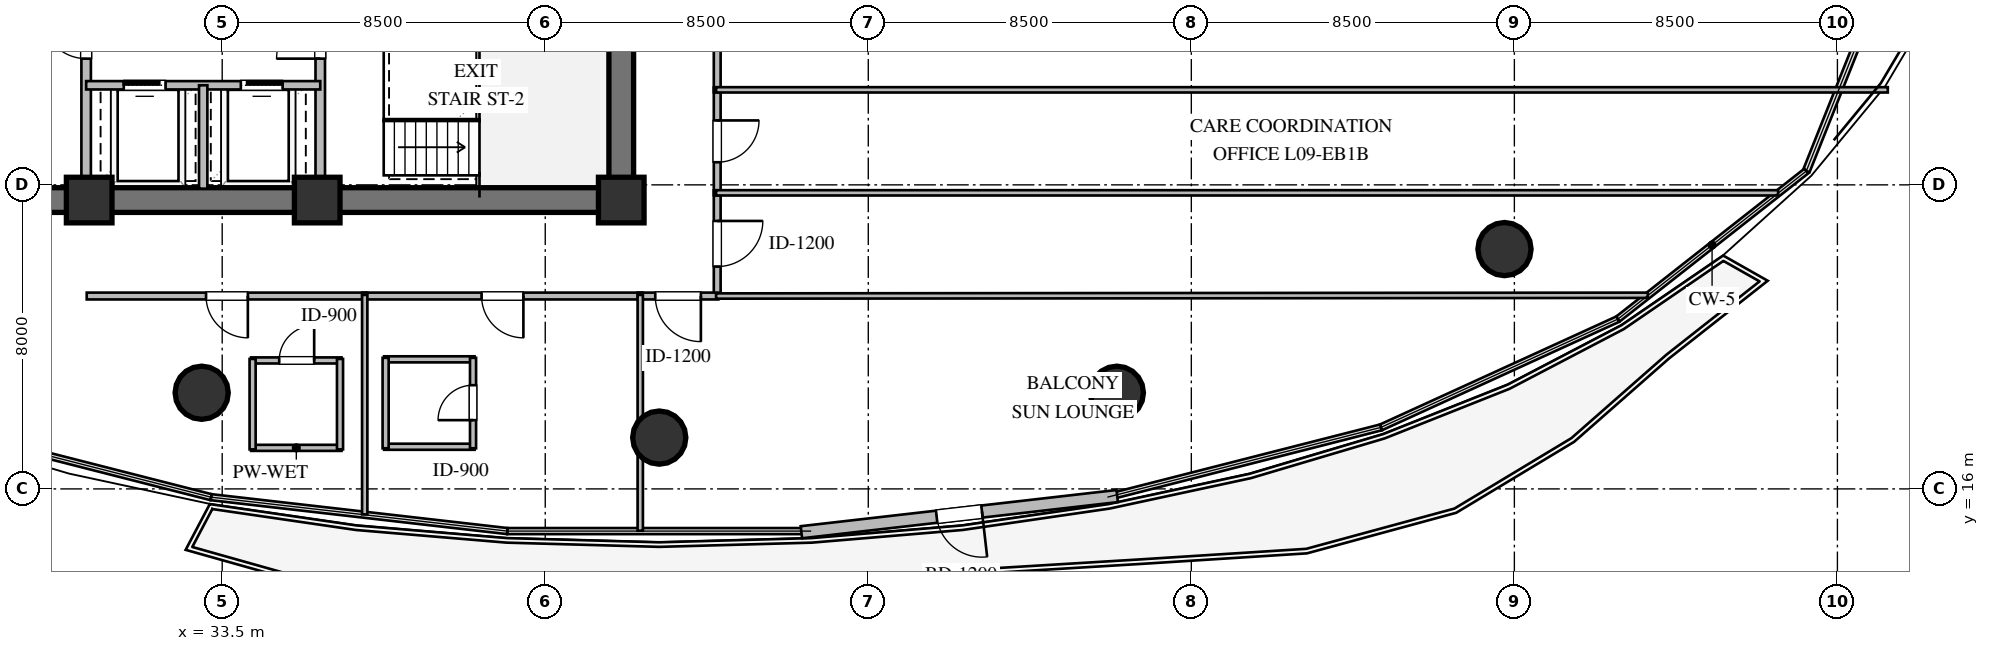
"""IFC4 building model, lengths in metres.
Left out: names, types, materials, properties, quantities, classifications, styles, units other than length and angle.
Written with IfcOpenShell. Run it as: python <this file> out.ifc"""

import sys

from ifc_helpers import new_model, si_unit, direction, frame, frame_2d, origin, origin_2d, place, context, subcontext, project, spatial, rectangle, circle, extrude, element, fill, save


model = new_model("IFC4")
c1 = context("Model", 3, precision=1e-05, world=origin(), true_north=direction((0.0, 1.0)))
c2 = subcontext(c1, "Body", "Model", "MODEL_VIEW")
j1 = project(units=[si_unit("LENGTHUNIT", "METRE"), si_unit("PLANEANGLEUNIT", "RADIAN")], contexts=[c1])
p1 = place(None, origin())
s1 = spatial("IfcSite", under=j1, at=p1, CompositionType="ELEMENT")
p2 = place(p1, origin())
s2 = spatial("IfcBuilding", under=s1, at=p2, CompositionType="ELEMENT")
p3 = place(p2, frame((0.0, 0.0, 38.4)))
s3 = spatial("IfcBuildingStorey", under=s2, at=p3, CompositionType="ELEMENT", Elevation=38.4)
p4 = place(p3, frame((21.675, 23.6, 0.0), z_axis=(0.0, 0.0, 1.0), x_axis=(1.0, 0.0, 0.0)))
e1 = element("IfcWall", 1, at=p4, inside=s3, PredefinedType="SHEAR", context=c2, shape_type="SweptSolid", body=[
    extrude(rectangle(XDim=22.65, YDim=0.65, at=frame_2d((11.325, 0.0))), origin(), (0.0, 0.0, 1.0), 3.36),
])
p5 = place(p3, frame((44.0, 23.925, 0.0), z_axis=(0.0, 0.0, 1.0), x_axis=(0.0, 1.0, 0.0)))
e2 = element("IfcWall", 2, at=p5, inside=s3, PredefinedType="SHEAR", context=c2, shape_type="SweptSolid", body=[
    extrude(rectangle(XDim=12.15, YDim=0.65, at=frame_2d((6.075, 0.0))), origin(), (0.0, 0.0, 1.0), 3.36),
])
p6 = place(p5, frame((8.775, 0.0, 0.0)))
e3 = element("IfcOpeningElement", 3, at=p6, cuts=e2, PredefinedType="OPENING", context=c2, shape_type="SweptSolid", body=[
    extrude(rectangle(XDim=1.5, YDim=2.15, at=frame_2d((0.75, 1.075))), frame((0.0, 0.335, 0.0), z_axis=(0.0, -1.0, 0.0), x_axis=(1.0, 0.0, 0.0)), (0.0, 0.0, 1.0), 0.67),
])
for number, where, z_axis, x_axis in (
    (4, (30.0, 23.6, 0.0), (0.0, 0.0, 1.0), (1.0, 0.0, 0.0)),
    (5, (36.0, 23.6, 0.0), (0.0, 0.0, 1.0), (1.0, 0.0, 0.0)),
    (6, (44.0, 23.6, 0.0), (0.0, 0.0, 1.0), (1.0, 0.0, 0.0)),
):
    element("IfcColumn", number, at=place(p3, frame(where, z_axis=z_axis, x_axis=x_axis)), inside=s3, PredefinedType="COLUMN", context=c2, shape_type="SweptSolid", body=[
        extrude(rectangle(XDim=1.2, YDim=1.2, at=origin_2d()), origin(), (0.0, 0.0, 1.0), 3.6),
    ])
for number, where, z_axis, x_axis in (
    (7, (32.96, 18.53, 0.0), (0.0, 0.0, 1.0), (1.0, 0.0, 0.0)),
    (8, (45.0, 17.35, 0.0), (0.0, 0.0, 1.0), (1.0, 0.0, 0.0)),
    (9, (57.04, 18.53, 0.0), (0.0, 0.0, 1.0), (1.0, 0.0, 0.0)),
    (10, (67.24, 22.31, 0.0), (0.0, 0.0, 1.0), (1.0, 0.0, 0.0)),
):
    element("IfcColumn", number, at=place(p3, frame(where, z_axis=z_axis, x_axis=x_axis)), inside=s3, PredefinedType="COLUMN", context=c2, shape_type="SweptSolid", body=[
        extrude(circle(Radius=0.7, at=origin_2d()), origin(), (0.0, 0.0, 1.0), 3.6),
    ])
p7 = place(p3, frame((57.05, 15.812, 0.0), z_axis=(0.0, 0.0, 1.0), x_axis=(-0.993503192468, -0.113804246649, 0.0)))
e11 = element("IfcWall", 11, at=p7, inside=s3, PredefinedType="STANDARD", context=c2, shape_type="SweptSolid", body=[
    extrude(rectangle(XDim=8.365, YDim=0.32, at=frame_2d((4.182, 0.0))), origin(), (0.0, 0.0, 1.0), 3.36),
])
p8 = place(p7, frame((3.582, 0.0, 0.0)))
e12 = element("IfcOpeningElement", 12, at=p8, cuts=e11, PredefinedType="OPENING", context=c2, shape_type="SweptSolid", body=[
    extrude(rectangle(XDim=1.2, YDim=2.15, at=frame_2d((0.6, 1.075))), frame((0.0, 0.17, 0.0), z_axis=(0.0, -1.0, 0.0), x_axis=(1.0, 0.0, 0.0)), (0.0, 0.0, 1.0), 0.34),
])
p9 = place(p3, frame((29.92, 23.9, 0.0), z_axis=(0.0, 0.0, 1.0), x_axis=(0.0, 1.0, 0.0)))
e13 = element("IfcWall", 13, at=p9, inside=s3, PredefinedType="SOLIDWALL", context=c2, shape_type="SweptSolid", body=[
    extrude(rectangle(XDim=5.4, YDim=0.25, at=frame_2d((2.7, 0.0))), origin(), (0.0, 0.0, 1.0), 3.36),
])
p10 = place(p9, frame((3.421, 0.0, 0.0)))
e14 = element("IfcOpeningElement", 14, at=p10, cuts=e13, PredefinedType="OPENING", context=c2, shape_type="SweptSolid", body=[
    extrude(rectangle(XDim=1.15, YDim=2.1, at=frame_2d((0.575, 1.05))), frame((0.0, 0.135, 0.0), z_axis=(0.0, -1.0, 0.0), x_axis=(1.0, 0.0, 0.0)), (0.0, 0.0, 1.0), 0.27),
])
p11 = place(p3, frame((36.08, 23.9, 0.0), z_axis=(0.0, 0.0, 1.0), x_axis=(0.0, 1.0, 0.0)))
e15 = element("IfcWall", 15, at=p11, inside=s3, PredefinedType="SOLIDWALL", context=c2, shape_type="SweptSolid", body=[
    extrude(rectangle(XDim=5.4, YDim=0.25, at=frame_2d((2.7, 0.0))), origin(), (0.0, 0.0, 1.0), 3.36),
])
p12 = place(p11, frame((3.421, 0.0, 0.0)))
e16 = element("IfcOpeningElement", 16, at=p12, cuts=e15, PredefinedType="OPENING", context=c2, shape_type="SweptSolid", body=[
    extrude(rectangle(XDim=1.15, YDim=2.1, at=frame_2d((0.575, 1.05))), frame((0.0, 0.135, 0.0), z_axis=(0.0, -1.0, 0.0), x_axis=(1.0, 0.0, 0.0)), (0.0, 0.0, 1.0), 0.27),
])
p13 = place(p3, frame((29.92, 26.62, 0.0), z_axis=(0.0, 0.0, 1.0), x_axis=(1.0, 0.0, 0.0)))
e17 = element("IfcWall", 17, at=p13, inside=s3, PredefinedType="SOLIDWALL", context=c2, shape_type="SweptSolid", body=[
    extrude(rectangle(XDim=6.16, YDim=0.22, at=frame_2d((3.08, 0.0))), origin(), (0.0, 0.0, 1.0), 3.36),
])
p14 = place(p13, frame((0.99, 0.0, 0.0)))
e18 = element("IfcOpeningElement", 18, at=p14, cuts=e17, PredefinedType="OPENING", context=c2, shape_type="SweptSolid", body=[
    extrude(rectangle(XDim=1.1, YDim=2.1, at=frame_2d((0.55, 1.05))), frame((0.0, 0.12, 0.0), z_axis=(0.0, -1.0, 0.0), x_axis=(1.0, 0.0, 0.0)), (0.0, 0.0, 1.0), 0.24),
])
p15 = place(p13, frame((4.07, 0.0, 0.0)))
e19 = element("IfcOpeningElement", 19, at=p15, cuts=e17, PredefinedType="OPENING", context=c2, shape_type="SweptSolid", body=[
    extrude(rectangle(XDim=1.1, YDim=2.1, at=frame_2d((0.55, 1.05))), frame((0.0, 0.12, 0.0), z_axis=(0.0, -1.0, 0.0), x_axis=(1.0, 0.0, 0.0)), (0.0, 0.0, 1.0), 0.24),
])
p16 = place(p3, frame((33.0, 23.9, 0.0), z_axis=(0.0, 0.0, 1.0), x_axis=(0.0, 1.0, 0.0)))
e20 = element("IfcWall", 20, at=p16, inside=s3, PredefinedType="SOLIDWALL", context=c2, shape_type="SweptSolid", body=[
    extrude(rectangle(XDim=2.72, YDim=0.22, at=frame_2d((1.36, 0.0))), origin(), (0.0, 0.0, 1.0), 3.36),
])
p17 = place(p3, frame((34.26, 17.08, 0.0), z_axis=(0.0, 0.0, 1.0), x_axis=(1.0, 0.0, 0.0)))
e21 = element("IfcWall", 21, at=p17, inside=s3, PredefinedType="PLUMBINGWALL", context=c2, shape_type="SweptSolid", body=[
    extrude(rectangle(XDim=2.38, YDim=0.16, at=frame_2d((1.19, 0.0))), origin(), (0.0, 0.0, 1.0), 3.36),
])
p18 = place(p3, frame((34.26, 19.38, 0.0), z_axis=(0.0, 0.0, 1.0), x_axis=(1.0, 0.0, 0.0)))
e22 = element("IfcWall", 22, at=p18, inside=s3, PredefinedType="PLUMBINGWALL", context=c2, shape_type="SweptSolid", body=[
    extrude(rectangle(XDim=2.38, YDim=0.16, at=frame_2d((1.19, 0.0))), origin(), (0.0, 0.0, 1.0), 3.36),
])
p19 = place(p18, frame((0.74, 0.0, 0.0)))
e23 = element("IfcOpeningElement", 23, at=p19, cuts=e22, PredefinedType="OPENING", context=c2, shape_type="SweptSolid", body=[
    extrude(rectangle(XDim=0.92, YDim=2.1, at=frame_2d((0.46, 1.05))), frame((0.0, 0.09, 0.0), z_axis=(0.0, -1.0, 0.0), x_axis=(1.0, 0.0, 0.0)), (0.0, 0.0, 1.0), 0.18),
])
for number, where, z_axis, x_axis in (
    (24, (34.3, 17.04, 0.0), (0.0, 0.0, 1.0), (0.0, 1.0, 0.0)),
    (25, (36.6, 17.04, 0.0), (0.0, 0.0, 1.0), (0.0, 1.0, 0.0)),
    (26, (37.76, 17.109, 0.0), (0.0, 0.0, 1.0), (1.0, 0.0, 0.0)),
    (27, (37.76, 19.409, 0.0), (0.0, 0.0, 1.0), (1.0, 0.0, 0.0)),
    (28, (37.8, 17.069, 0.0), (0.0, 0.0, 1.0), (0.0, 1.0, 0.0)),
):
    element("IfcWall", number, at=place(p3, frame(where, z_axis=z_axis, x_axis=x_axis)), inside=s3, PredefinedType="PLUMBINGWALL", context=c2, shape_type="SweptSolid", body=[
        extrude(rectangle(XDim=2.38, YDim=0.16, at=frame_2d((1.19, 0.0))), origin(), (0.0, 0.0, 1.0), 3.36),
    ])
p20 = place(p3, frame((40.1, 17.069, 0.0), z_axis=(0.0, 0.0, 1.0), x_axis=(0.0, 1.0, 0.0)))
e29 = element("IfcWall", 29, at=p20, inside=s3, PredefinedType="PLUMBINGWALL", context=c2, shape_type="SweptSolid", body=[
    extrude(rectangle(XDim=2.38, YDim=0.16, at=frame_2d((1.19, 0.0))), origin(), (0.0, 0.0, 1.0), 3.36),
])
p21 = place(p20, frame((0.74, 0.0, 0.0)))
e30 = element("IfcOpeningElement", 30, at=p21, cuts=e29, PredefinedType="OPENING", context=c2, shape_type="SweptSolid", body=[
    extrude(rectangle(XDim=0.92, YDim=2.1, at=frame_2d((0.46, 1.05))), frame((0.0, 0.09, 0.0), z_axis=(0.0, -1.0, 0.0), x_axis=(1.0, 0.0, 0.0)), (0.0, 0.0, 1.0), 0.18),
])
p22 = place(p3, frame((46.525, 23.855, 0.0), z_axis=(0.0, 0.0, 1.0), x_axis=(0.0, -1.0, 0.0)))
e31 = element("IfcWall", 31, at=p22, inside=s3, PredefinedType="PARTITIONING", context=c2, shape_type="SweptSolid", body=[
    extrude(rectangle(XDim=2.81, YDim=0.18, at=frame_2d((1.405, 0.0))), origin(), (0.0, 0.0, 1.0), 3.36),
])
p23 = place(p22, frame((0.805, 0.0, 0.0)))
e32 = element("IfcOpeningElement", 32, at=p23, cuts=e31, PredefinedType="OPENING", context=c2, shape_type="SweptSolid", body=[
    extrude(rectangle(XDim=1.2, YDim=2.15, at=frame_2d((0.6, 1.075))), frame((0.0, 0.1, 0.0), z_axis=(0.0, -1.0, 0.0), x_axis=(1.0, 0.0, 0.0)), (0.0, 0.0, 1.0), 0.2),
])
p24 = place(p3, frame((46.525, 26.565, 0.0), z_axis=(0.0, 0.0, 1.0), x_axis=(0.0, -1.0, 0.0)))
e33 = element("IfcWall", 33, at=p24, inside=s3, PredefinedType="PARTITIONING", context=c2, shape_type="SweptSolid", body=[
    extrude(rectangle(XDim=2.84, YDim=0.18, at=frame_2d((1.42, 0.0))), origin(), (0.0, 0.0, 1.0), 3.36),
])
p25 = place(p24, frame((0.87, 0.0, 0.0)))
e34 = element("IfcOpeningElement", 34, at=p25, cuts=e33, PredefinedType="OPENING", context=c2, shape_type="SweptSolid", body=[
    extrude(rectangle(XDim=1.1, YDim=2.1, at=frame_2d((0.55, 1.05))), frame((0.0, 0.1, 0.0), z_axis=(0.0, -1.0, 0.0), x_axis=(1.0, 0.0, 0.0)), (0.0, 0.0, 1.0), 0.2),
])
p26 = place(p3, frame((46.525, 30.565, 0.0), z_axis=(0.0, 0.0, 1.0), x_axis=(0.0, -1.0, 0.0)))
e35 = element("IfcWall", 35, at=p26, inside=s3, PredefinedType="PARTITIONING", context=c2, shape_type="SweptSolid", body=[
    extrude(rectangle(XDim=4.13, YDim=0.18, at=frame_2d((2.065, 0.0))), origin(), (0.0, 0.0, 1.0), 3.36),
])
p27 = place(p26, frame((1.515, 0.0, 0.0)))
e36 = element("IfcOpeningElement", 36, at=p27, cuts=e35, PredefinedType="OPENING", context=c2, shape_type="SweptSolid", body=[
    extrude(rectangle(XDim=1.1, YDim=2.1, at=frame_2d((0.55, 1.05))), frame((0.0, 0.1, 0.0), z_axis=(0.0, -1.0, 0.0), x_axis=(1.0, 0.0, 0.0)), (0.0, 0.0, 1.0), 0.2),
])
p28 = place(p3, frame((37.315, 21.075, 0.0), z_axis=(0.0, 0.0, 1.0), x_axis=(-1.0, 0.0, 0.0)))
e37 = element("IfcWall", 37, at=p28, inside=s3, PredefinedType="PARTITIONING", context=c2, shape_type="SweptSolid", body=[
    extrude(rectangle(XDim=7.38, YDim=0.18, at=frame_2d((3.69, 0.0))), origin(), (0.0, 0.0, 1.0), 2.996),
])
p29 = place(p28, frame((3.14, 0.0, 0.0)))
e38 = element("IfcOpeningElement", 38, at=p29, cuts=e37, PredefinedType="OPENING", context=c2, shape_type="SweptSolid", body=[
    extrude(rectangle(XDim=1.1, YDim=2.1, at=frame_2d((0.55, 1.05))), frame((0.0, 0.1, 0.0), z_axis=(0.0, -1.0, 0.0), x_axis=(1.0, 0.0, 0.0)), (0.0, 0.0, 1.0), 0.2),
])
p30 = place(p3, frame((44.565, 21.075, 0.0), z_axis=(0.0, 0.0, 1.0), x_axis=(-1.0, 0.0, 0.0)))
e39 = element("IfcWall", 39, at=p30, inside=s3, PredefinedType="PARTITIONING", context=c2, shape_type="SweptSolid", body=[
    extrude(rectangle(XDim=7.38, YDim=0.18, at=frame_2d((3.69, 0.0))), origin(), (0.0, 0.0, 1.0), 2.996),
])
p31 = place(p30, frame((3.14, 0.0, 0.0)))
e40 = element("IfcOpeningElement", 40, at=p31, cuts=e39, PredefinedType="OPENING", context=c2, shape_type="SweptSolid", body=[
    extrude(rectangle(XDim=1.1, YDim=2.1, at=frame_2d((0.55, 1.05))), frame((0.0, 0.1, 0.0), z_axis=(0.0, -1.0, 0.0), x_axis=(1.0, 0.0, 0.0)), (0.0, 0.0, 1.0), 0.2),
])
p32 = place(p3, frame((46.555, 21.075, 0.0), z_axis=(0.0, 0.0, 1.0), x_axis=(-1.0, 0.0, 0.0)))
e41 = element("IfcWall", 41, at=p32, inside=s3, PredefinedType="PARTITIONING", context=c2, shape_type="SweptSolid", body=[
    extrude(rectangle(XDim=2.12, YDim=0.18, at=frame_2d((1.06, 0.0))), origin(), (0.0, 0.0, 1.0), 3.36),
])
p33 = place(p32, frame((0.46, 0.0, 0.0)))
e42 = element("IfcOpeningElement", 42, at=p33, cuts=e41, PredefinedType="OPENING", context=c2, shape_type="SweptSolid", body=[
    extrude(rectangle(XDim=1.2, YDim=2.15, at=frame_2d((0.6, 1.075))), frame((0.0, 0.1, 0.0), z_axis=(0.0, -1.0, 0.0), x_axis=(1.0, 0.0, 0.0)), (0.0, 0.0, 1.0), 0.2),
])
p34 = place(p3, frame((46.495, 23.79, 0.0), z_axis=(0.0, 0.0, 1.0), x_axis=(1.0, 0.0, 0.0)))
e43 = element("IfcWall", 43, at=p34, inside=s3, PredefinedType="PARTITIONING", context=c2, shape_type="SweptSolid", body=[
    extrude(rectangle(XDim=27.946, YDim=0.14, at=frame_2d((13.973, 0.0))), origin(), (0.0, 0.0, 1.0), 2.89),
])
p35 = place(p3, frame((71.011, 21.094, 0.0), z_axis=(0.0, 0.0, 1.0), x_axis=(-0.999999682646, -0.000796685534, 0.0)))
e44 = element("IfcWall", 44, at=p35, inside=s3, PredefinedType="PARTITIONING", context=c2, shape_type="SweptSolid", body=[
    extrude(rectangle(XDim=24.516, YDim=0.14, at=frame_2d((12.258, 0.0))), origin(), (0.0, 0.0, 1.0), 2.996),
])
p36 = place(p3, frame((46.495, 26.5, 0.0), z_axis=(0.0, 0.0, 1.0), x_axis=(1.0, 0.0, 0.0)))
e45 = element("IfcWall", 45, at=p36, inside=s3, PredefinedType="PARTITIONING", context=c2, shape_type="SweptSolid", body=[
    extrude(rectangle(XDim=30.831, YDim=0.14, at=frame_2d((15.416, 0.0))), origin(), (0.0, 0.0, 1.0), 2.89),
])
p37 = place(p3, frame((37.25, 21.105, 0.0), z_axis=(0.0, 0.0, 1.0), x_axis=(0.0, -1.0, 0.0)))
e46 = element("IfcWall", 46, at=p37, inside=s3, PredefinedType="PARTITIONING", context=c2, shape_type="SweptSolid", body=[
    extrude(rectangle(XDim=5.776, YDim=0.14, at=frame_2d((2.888, 0.0))), origin(), (0.0, 0.0, 1.0), 3.36),
])
p38 = place(p3, frame((44.5, 21.105, 0.0), z_axis=(0.0, 0.0, 1.0), x_axis=(0.0, -1.0, 0.0)))
e47 = element("IfcWall", 47, at=p38, inside=s3, PredefinedType="PARTITIONING", context=c2, shape_type="SweptSolid", body=[
    extrude(rectangle(XDim=6.205, YDim=0.14, at=frame_2d((3.103, 0.0))), origin(), (0.0, 0.0, 1.0), 2.89),
])
p39 = place(p8, origin())
e48 = element("IfcDoor", 48, at=p39, inside=s3, OperationType="SINGLE_SWING_LEFT", PredefinedType="DOOR", context=c2, shape_type="SweptSolid", body=[
    extrude(rectangle(XDim=1.2, YDim=2.15, at=frame_2d((0.6, 1.075))), frame((0.0, 0.025, 0.0), z_axis=(0.0, -1.0, 0.0), x_axis=(1.0, 0.0, 0.0)), (0.0, 0.0, 1.0), 0.05),
])
fill(e12, e48)
p40 = place(p10, origin())
e49 = element("IfcDoor", 49, at=p40, inside=s3, OperationType="SINGLE_SWING_RIGHT", PredefinedType="DOOR", context=c2, shape_type="SweptSolid", body=[
    extrude(rectangle(XDim=1.15, YDim=2.1, at=frame_2d((0.575, 1.05))), frame((0.0, 0.025, 0.0), z_axis=(0.0, -1.0, 0.0), x_axis=(1.0, 0.0, 0.0)), (0.0, 0.0, 1.0), 0.05),
])
fill(e14, e49)
p41 = place(p12, origin())
e50 = element("IfcDoor", 50, at=p41, inside=s3, OperationType="SINGLE_SWING_LEFT", PredefinedType="DOOR", context=c2, shape_type="SweptSolid", body=[
    extrude(rectangle(XDim=1.15, YDim=2.1, at=frame_2d((0.575, 1.05))), frame((0.0, 0.025, 0.0), z_axis=(0.0, -1.0, 0.0), x_axis=(1.0, 0.0, 0.0)), (0.0, 0.0, 1.0), 0.05),
])
fill(e16, e50)
p42 = place(p14, origin())
e51 = element("IfcDoor", 51, at=p42, inside=s3, OperationType="SLIDING_TO_LEFT", PredefinedType="DOOR", context=c2, shape_type="SweptSolid", body=[
    extrude(rectangle(XDim=1.1, YDim=2.1, at=frame_2d((0.55, 1.05))), frame((0.0, 0.025, 0.0), z_axis=(0.0, -1.0, 0.0), x_axis=(1.0, 0.0, 0.0)), (0.0, 0.0, 1.0), 0.05),
])
fill(e18, e51)
p43 = place(p15, origin())
e52 = element("IfcDoor", 52, at=p43, inside=s3, OperationType="SLIDING_TO_RIGHT", PredefinedType="DOOR", context=c2, shape_type="SweptSolid", body=[
    extrude(rectangle(XDim=1.1, YDim=2.1, at=frame_2d((0.55, 1.05))), frame((0.0, 0.025, 0.0), z_axis=(0.0, -1.0, 0.0), x_axis=(1.0, 0.0, 0.0)), (0.0, 0.0, 1.0), 0.05),
])
fill(e19, e52)
p44 = place(p19, origin())
e53 = element("IfcDoor", 53, at=p44, inside=s3, OperationType="SINGLE_SWING_RIGHT", PredefinedType="DOOR", context=c2, shape_type="SweptSolid", body=[
    extrude(rectangle(XDim=0.92, YDim=2.1, at=frame_2d((0.46, 1.05))), frame((0.0, 0.025, 0.0), z_axis=(0.0, -1.0, 0.0), x_axis=(1.0, 0.0, 0.0)), (0.0, 0.0, 1.0), 0.05),
])
fill(e23, e53)
p45 = place(p21, origin())
e54 = element("IfcDoor", 54, at=p45, inside=s3, OperationType="SINGLE_SWING_LEFT", PredefinedType="DOOR", context=c2, shape_type="SweptSolid", body=[
    extrude(rectangle(XDim=0.92, YDim=2.1, at=frame_2d((0.46, 1.05))), frame((0.0, 0.025, 0.0), z_axis=(0.0, -1.0, 0.0), x_axis=(1.0, 0.0, 0.0)), (0.0, 0.0, 1.0), 0.05),
])
fill(e30, e54)
p46 = place(p23, origin())
e55 = element("IfcDoor", 55, at=p46, inside=s3, OperationType="SINGLE_SWING_LEFT", PredefinedType="DOOR", context=c2, shape_type="SweptSolid", body=[
    extrude(rectangle(XDim=1.2, YDim=2.15, at=frame_2d((0.6, 1.075))), frame((0.0, 0.025, 0.0), z_axis=(0.0, -1.0, 0.0), x_axis=(1.0, 0.0, 0.0)), (0.0, 0.0, 1.0), 0.05),
])
fill(e32, e55)
p47 = place(p25, origin())
e56 = element("IfcDoor", 56, at=p47, inside=s3, OperationType="SINGLE_SWING_LEFT", PredefinedType="DOOR", context=c2, shape_type="SweptSolid", body=[
    extrude(rectangle(XDim=1.1, YDim=2.1, at=frame_2d((0.55, 1.05))), frame((0.0, 0.025, 0.0), z_axis=(0.0, -1.0, 0.0), x_axis=(1.0, 0.0, 0.0)), (0.0, 0.0, 1.0), 0.05),
])
fill(e34, e56)
p48 = place(p29, origin())
e57 = element("IfcDoor", 57, at=p48, inside=s3, OperationType="SINGLE_SWING_LEFT", PredefinedType="DOOR", context=c2, shape_type="SweptSolid", body=[
    extrude(rectangle(XDim=1.1, YDim=2.1, at=frame_2d((0.55, 1.05))), frame((0.0, 0.025, 0.0), z_axis=(0.0, -1.0, 0.0), x_axis=(1.0, 0.0, 0.0)), (0.0, 0.0, 1.0), 0.05),
])
fill(e38, e57)
p49 = place(p31, origin())
e58 = element("IfcDoor", 58, at=p49, inside=s3, OperationType="SINGLE_SWING_LEFT", PredefinedType="DOOR", context=c2, shape_type="SweptSolid", body=[
    extrude(rectangle(XDim=1.1, YDim=2.1, at=frame_2d((0.55, 1.05))), frame((0.0, 0.025, 0.0), z_axis=(0.0, -1.0, 0.0), x_axis=(1.0, 0.0, 0.0)), (0.0, 0.0, 1.0), 0.05),
])
fill(e40, e58)
p50 = place(p33, origin())
e59 = element("IfcDoor", 59, at=p50, inside=s3, OperationType="SINGLE_SWING_LEFT", PredefinedType="DOOR", context=c2, shape_type="SweptSolid", body=[
    extrude(rectangle(XDim=1.2, YDim=2.15, at=frame_2d((0.6, 1.075))), frame((0.0, 0.025, 0.0), z_axis=(0.0, -1.0, 0.0), x_axis=(1.0, 0.0, 0.0)), (0.0, 0.0, 1.0), 0.05),
])
fill(e42, e59)
save(model, sys.argv[1])
